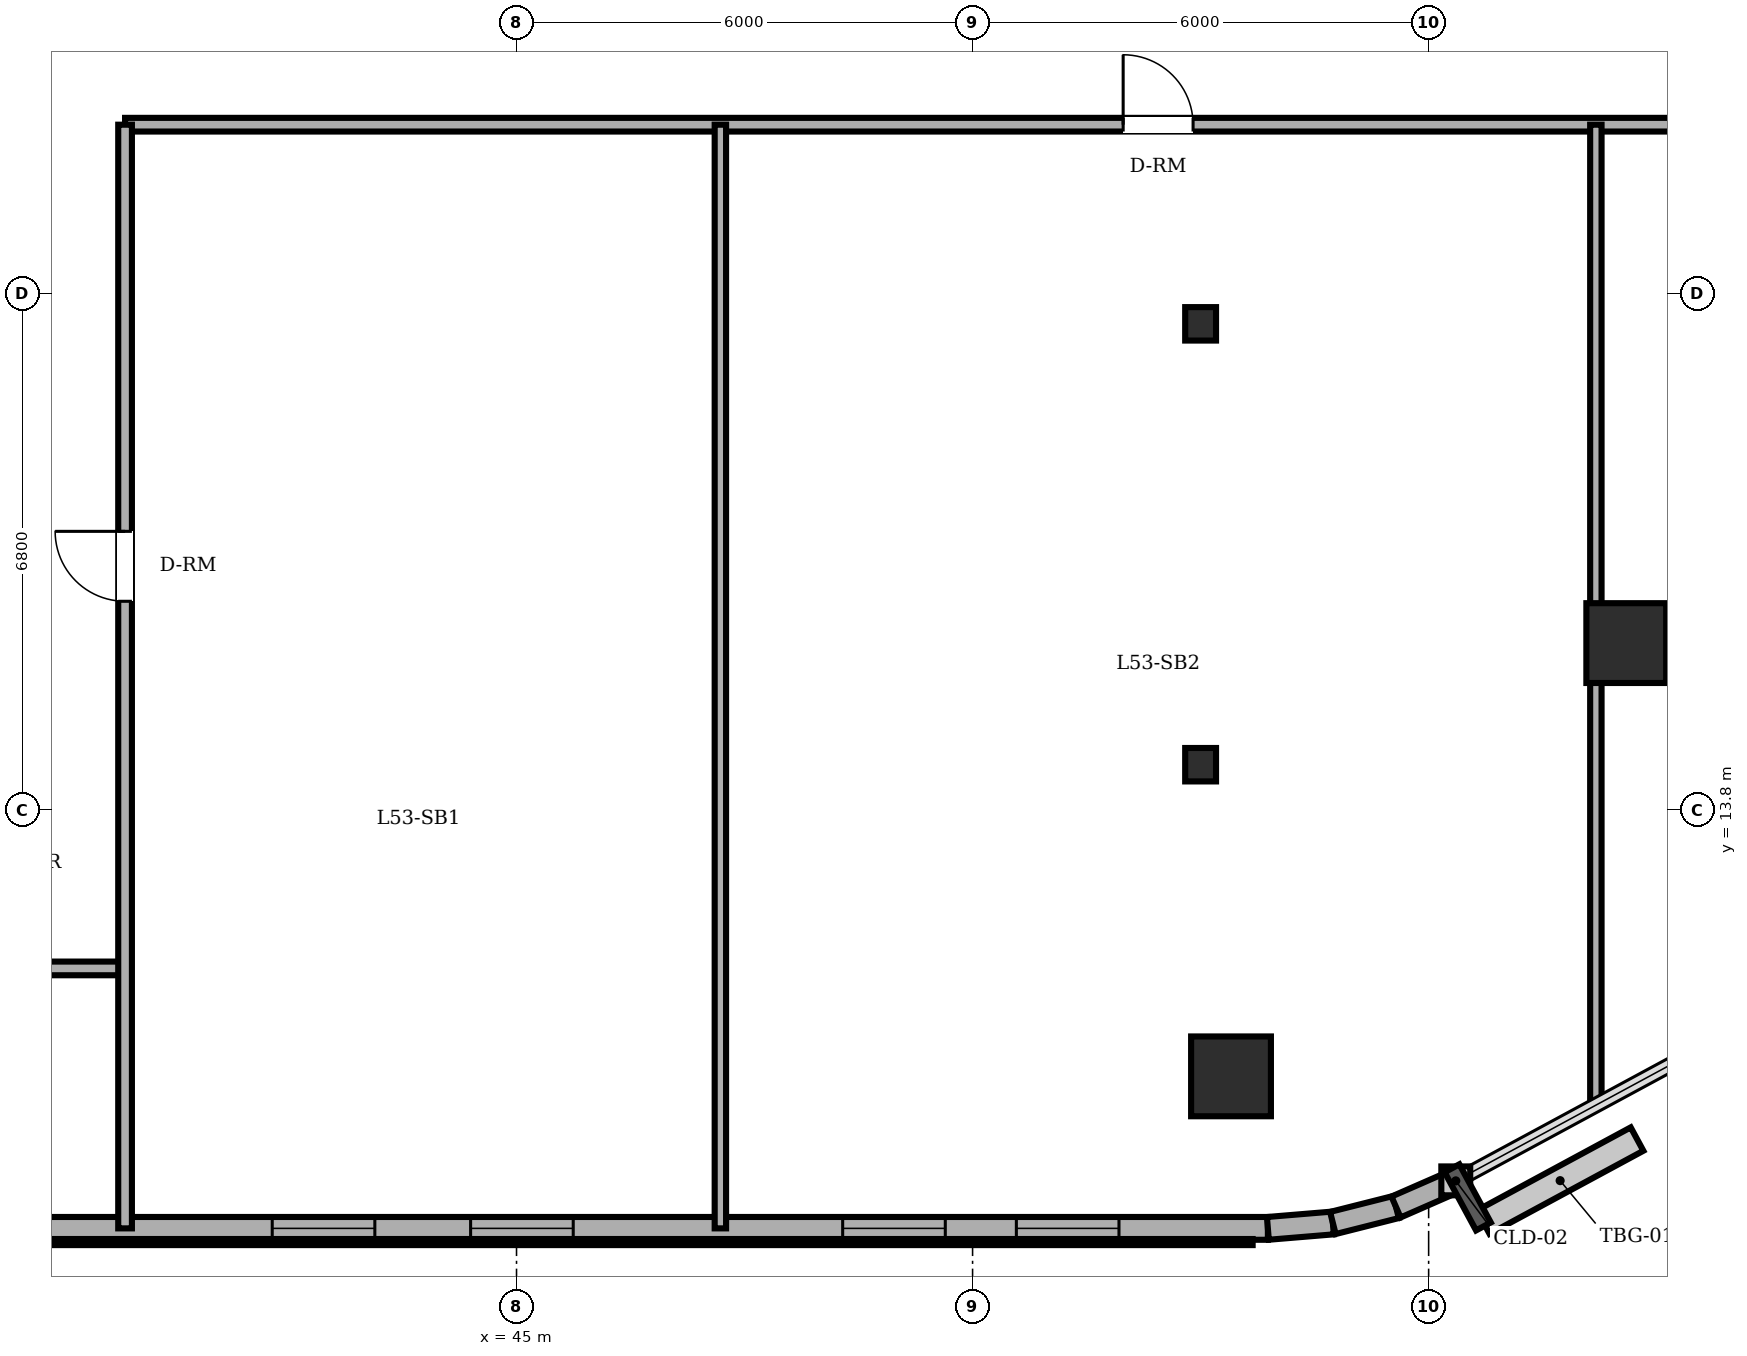
"""IFC4 building model, lengths in metres.
Left out: names, types, materials, properties, quantities, classifications, styles, units other than length and angle.
Written with IfcOpenShell. Run it as: python <this file> out.ifc"""

import sys

from ifc_helpers import new_model, si_unit, direction, frame, frame_2d, origin, origin_2d, place, context, subcontext, project, spatial, rectangle, circle, i_section, extrude, element, fill, save


model = new_model("IFC4")
c1 = context("Model", 3, precision=1e-05, world=origin(), true_north=direction((0.0, 1.0)))
c2 = subcontext(c1, "Body", "Model", "MODEL_VIEW")
j1 = project(units=[si_unit("LENGTHUNIT", "METRE"), si_unit("PLANEANGLEUNIT", "RADIAN")], contexts=[c1])
p1 = place(None, origin())
s1 = spatial("IfcSite", under=j1, at=p1, CompositionType="ELEMENT")
p2 = place(p1, origin())
s2 = spatial("IfcBuilding", under=s1, at=p2, CompositionType="ELEMENT")
p3 = place(p2, frame((0.0, 0.0, 204.9)))
s3 = spatial("IfcBuildingStorey", under=s2, at=p3, CompositionType="ELEMENT", Elevation=204.9)
for number, where, z_axis, x_axis in (
    (1, (54.4, 10.3, 0.0), (0.0, 0.0, 1.0), (1.0, 0.0, 0.0)),
    (2, (59.6, 16.0, 0.0), (0.0, 0.0, 1.0), (1.0, 0.0, 0.0)),
):
    element("IfcColumn", number, at=place(p3, frame(where, z_axis=z_axis, x_axis=x_axis)), inside=s3, PredefinedType="COLUMN", context=c2, shape_type="SweptSolid", body=[
        extrude(circle(Radius=0.525, at=origin_2d()), origin(), (0.0, 0.0, 1.0), 3.6),
    ])
for number, where, z_axis, x_axis in (
    (3, (54.0, 14.4, 0.0), (0.0, 0.0, 1.0), (1.0, 0.0, 0.0)),
    (4, (54.0, 20.2, 0.0), (0.0, 0.0, 1.0), (1.0, 0.0, 0.0)),
):
    element("IfcColumn", number, at=place(p3, frame(where, z_axis=z_axis, x_axis=x_axis)), inside=s3, PredefinedType="COLUMN", context=c2, shape_type="SweptSolid", body=[
        extrude(i_section(OverallWidth=0.406, OverallDepth=0.44, WebThickness=0.024, FlangeThickness=0.039, FilletRadius=0.015, at=origin_2d()), origin(), (0.0, 0.0, 1.0), 3.6),
    ])
p4 = place(p3, frame((22.4, 8.3, 0.0), z_axis=(0.0, 0.0, 1.0), x_axis=(1.0, 0.0, 0.0)))
e5 = element("IfcWall", 5, at=p4, inside=s3, PredefinedType="SOLIDWALL", context=c2, shape_type="SweptSolid", body=[
    extrude(rectangle(XDim=32.485, YDim=0.3, at=frame_2d((16.243, 0.0))), origin(), (0.0, 0.0, 1.0), 3.4),
])
p5 = place(p4, frame((8.175, 0.0, 0.0)))
e6 = element("IfcOpeningElement", 6, at=p5, cuts=e5, PredefinedType="OPENING", context=c2, shape_type="SweptSolid", body=[
    extrude(rectangle(XDim=0.95, YDim=2.2, at=frame_2d((0.475, 1.1))), frame((0.0, 0.16, 0.0), z_axis=(0.0, -1.0, 0.0), x_axis=(1.0, 0.0, 0.0)), (0.0, 0.0, 1.0), 0.32),
])
p6 = place(p4, frame((1.3, 0.0, 0.85)))
e7 = element("IfcOpeningElement", 7, at=p6, cuts=e5, PredefinedType="OPENING", context=c2, shape_type="SweptSolid", body=[
    extrude(rectangle(XDim=1.35, YDim=1.55, at=frame_2d((0.675, 0.775))), frame((0.0, 0.16, 0.0), z_axis=(0.0, -1.0, 0.0), x_axis=(1.0, 0.0, 0.0)), (0.0, 0.0, 1.0), 0.32),
])
p7 = place(p4, frame((4.825, 0.0, 0.85)))
e8 = element("IfcOpeningElement", 8, at=p7, cuts=e5, PredefinedType="OPENING", context=c2, shape_type="SweptSolid", body=[
    extrude(rectangle(XDim=1.35, YDim=1.55, at=frame_2d((0.675, 0.775))), frame((0.0, 0.16, 0.0), z_axis=(0.0, -1.0, 0.0), x_axis=(1.0, 0.0, 0.0)), (0.0, 0.0, 1.0), 0.32),
])
p8 = place(p4, frame((10.075, 0.0, 0.85)))
e9 = element("IfcOpeningElement", 9, at=p8, cuts=e5, PredefinedType="OPENING", context=c2, shape_type="SweptSolid", body=[
    extrude(rectangle(XDim=1.35, YDim=1.55, at=frame_2d((0.675, 0.775))), frame((0.0, 0.16, 0.0), z_axis=(0.0, -1.0, 0.0), x_axis=(1.0, 0.0, 0.0)), (0.0, 0.0, 1.0), 0.32),
])
p9 = place(p4, frame((13.425, 0.0, 0.85)))
e10 = element("IfcOpeningElement", 10, at=p9, cuts=e5, PredefinedType="OPENING", context=c2, shape_type="SweptSolid", body=[
    extrude(rectangle(XDim=1.35, YDim=1.55, at=frame_2d((0.675, 0.775))), frame((0.0, 0.16, 0.0), z_axis=(0.0, -1.0, 0.0), x_axis=(1.0, 0.0, 0.0)), (0.0, 0.0, 1.0), 0.32),
])
p10 = place(p4, frame((19.386, 0.0, 0.85)))
e11 = element("IfcOpeningElement", 11, at=p10, cuts=e5, PredefinedType="OPENING", context=c2, shape_type="SweptSolid", body=[
    extrude(rectangle(XDim=1.35, YDim=1.55, at=frame_2d((0.675, 0.775))), frame((0.0, 0.16, 0.0), z_axis=(0.0, -1.0, 0.0), x_axis=(1.0, 0.0, 0.0)), (0.0, 0.0, 1.0), 0.32),
])
p11 = place(p4, frame((21.996, 0.0, 0.85)))
e12 = element("IfcOpeningElement", 12, at=p11, cuts=e5, PredefinedType="OPENING", context=c2, shape_type="SweptSolid", body=[
    extrude(rectangle(XDim=1.35, YDim=1.55, at=frame_2d((0.675, 0.775))), frame((0.0, 0.16, 0.0), z_axis=(0.0, -1.0, 0.0), x_axis=(1.0, 0.0, 0.0)), (0.0, 0.0, 1.0), 0.32),
])
p12 = place(p4, frame((26.891, 0.0, 0.85)))
e13 = element("IfcOpeningElement", 13, at=p12, cuts=e5, PredefinedType="OPENING", context=c2, shape_type="SweptSolid", body=[
    extrude(rectangle(XDim=1.35, YDim=1.55, at=frame_2d((0.675, 0.775))), frame((0.0, 0.16, 0.0), z_axis=(0.0, -1.0, 0.0), x_axis=(1.0, 0.0, 0.0)), (0.0, 0.0, 1.0), 0.32),
])
p13 = place(p4, frame((29.176, 0.0, 0.85)))
e14 = element("IfcOpeningElement", 14, at=p13, cuts=e5, PredefinedType="OPENING", context=c2, shape_type="SweptSolid", body=[
    extrude(rectangle(XDim=1.35, YDim=1.55, at=frame_2d((0.675, 0.775))), frame((0.0, 0.16, 0.0), z_axis=(0.0, -1.0, 0.0), x_axis=(1.0, 0.0, 0.0)), (0.0, 0.0, 1.0), 0.32),
])
p14 = place(p3, frame((54.885, 8.3, 0.0), z_axis=(0.0, 0.0, 1.0), x_axis=(0.996565355958, 0.082809971041, 0.0)))
e15 = element("IfcWall", 15, at=p14, inside=s3, PredefinedType="SOLIDWALL", context=c2, shape_type="SweptSolid", body=[
    extrude(rectangle(XDim=0.858, YDim=0.3, at=frame_2d((0.429, 0.0))), origin(), (0.0, 0.0, 1.0), 3.4),
])
p15 = place(p3, frame((55.74, 8.371, 0.0), z_axis=(0.0, 0.0, 1.0), x_axis=(0.969536346338, 0.244947490555, 0.0)))
e16 = element("IfcWall", 16, at=p15, inside=s3, PredefinedType="SOLIDWALL", context=c2, shape_type="SweptSolid", body=[
    extrude(rectangle(XDim=0.857, YDim=0.3, at=frame_2d((0.429, 0.0))), origin(), (0.0, 0.0, 1.0), 3.4),
])
p16 = place(p3, frame((56.571, 8.581, 0.0), z_axis=(0.0, 0.0, 1.0), x_axis=(0.916085473636, 0.400983048261, 0.0)))
e17 = element("IfcWall", 17, at=p16, inside=s3, PredefinedType="SOLIDWALL", context=c2, shape_type="SweptSolid", body=[
    extrude(rectangle(XDim=0.858, YDim=0.3, at=frame_2d((0.429, 0.0))), origin(), (0.0, 0.0, 1.0), 3.4),
])
p17 = place(p3, frame((17.677, 11.72, 0.0), z_axis=(0.0, 0.0, 1.0), x_axis=(1.0, 0.0, 0.0)))
e18 = element("IfcWall", 18, at=p17, inside=s3, PredefinedType="PARTITIONING", context=c2, shape_type="SweptSolid", body=[
    extrude(rectangle(XDim=22.173, YDim=0.18, at=frame_2d((11.086, 0.0))), origin(), (0.0, 0.0, 1.0), 3.4),
])
p18 = place(p17, frame((9.763, 0.0, 0.0)))
e19 = element("IfcOpeningElement", 19, at=p18, cuts=e18, PredefinedType="OPENING", context=c2, shape_type="SweptSolid", body=[
    extrude(rectangle(XDim=0.92, YDim=2.1, at=frame_2d((0.46, 1.05))), frame((0.0, 0.1, 0.0), z_axis=(0.0, -1.0, 0.0), x_axis=(1.0, 0.0, 0.0)), (0.0, 0.0, 1.0), 0.2),
])
p19 = place(p17, frame((4.063, 0.0, 0.0)))
e20 = element("IfcOpeningElement", 20, at=p19, cuts=e18, PredefinedType="OPENING", context=c2, shape_type="SweptSolid", body=[
    extrude(rectangle(XDim=0.92, YDim=2.1, at=frame_2d((0.46, 1.05))), frame((0.0, 0.1, 0.0), z_axis=(0.0, -1.0, 0.0), x_axis=(1.0, 0.0, 0.0)), (0.0, 0.0, 1.0), 0.2),
])
p20 = place(p17, frame((16.428, 0.0, 0.0)))
e21 = element("IfcOpeningElement", 21, at=p20, cuts=e18, PredefinedType="OPENING", context=c2, shape_type="SweptSolid", body=[
    extrude(rectangle(XDim=0.92, YDim=2.1, at=frame_2d((0.46, 1.05))), frame((0.0, 0.1, 0.0), z_axis=(0.0, -1.0, 0.0), x_axis=(1.0, 0.0, 0.0)), (0.0, 0.0, 1.0), 0.2),
])
p21 = place(p3, frame((39.85, 22.82, 0.0), z_axis=(0.0, 0.0, 1.0), x_axis=(1.0, 0.0, 0.0)))
e22 = element("IfcWall", 22, at=p21, inside=s3, PredefinedType="PARTITIONING", context=c2, shape_type="SweptSolid", body=[
    extrude(rectangle(XDim=28.75, YDim=0.18, at=frame_2d((14.375, 0.0))), origin(), (0.0, 0.0, 1.0), 3.4),
])
p22 = place(p21, frame((13.131, 0.0, 0.0)))
e23 = element("IfcOpeningElement", 23, at=p22, cuts=e22, PredefinedType="OPENING", context=c2, shape_type="SweptSolid", body=[
    extrude(rectangle(XDim=0.92, YDim=2.1, at=frame_2d((0.46, 1.05))), frame((0.0, 0.1, 0.0), z_axis=(0.0, -1.0, 0.0), x_axis=(1.0, 0.0, 0.0)), (0.0, 0.0, 1.0), 0.2),
])
p23 = place(p21, frame((21.19, 0.0, 0.0)))
e24 = element("IfcOpeningElement", 24, at=p23, cuts=e22, PredefinedType="OPENING", context=c2, shape_type="SweptSolid", body=[
    extrude(rectangle(XDim=0.92, YDim=2.1, at=frame_2d((0.46, 1.05))), frame((0.0, 0.1, 0.0), z_axis=(0.0, -1.0, 0.0), x_axis=(1.0, 0.0, 0.0)), (0.0, 0.0, 1.0), 0.2),
])
p24 = place(p3, frame((39.85, 8.3, 0.0), z_axis=(0.0, 0.0, 1.0), x_axis=(0.0, 1.0, 0.0)))
e25 = element("IfcWall", 25, at=p24, inside=s3, PredefinedType="PARTITIONING", context=c2, shape_type="SweptSolid", body=[
    extrude(rectangle(XDim=14.52, YDim=0.18, at=frame_2d((7.26, 0.0))), origin(), (0.0, 0.0, 1.0), 3.4),
])
p25 = place(p24, frame((8.25, 0.0, 0.0)))
e26 = element("IfcOpeningElement", 26, at=p25, cuts=e25, PredefinedType="OPENING", context=c2, shape_type="SweptSolid", body=[
    extrude(rectangle(XDim=0.92, YDim=2.1, at=frame_2d((0.46, 1.05))), frame((0.0, 0.1, 0.0), z_axis=(0.0, -1.0, 0.0), x_axis=(1.0, 0.0, 0.0)), (0.0, 0.0, 1.0), 0.2),
])
p26 = place(p3, frame((47.682, 8.3, 0.0), z_axis=(0.0, 0.0, 1.0), x_axis=(0.0, 1.0, 0.0)))
e27 = element("IfcWall", 27, at=p26, inside=s3, PredefinedType="PARTITIONING", context=c2, shape_type="SweptSolid", body=[
    extrude(rectangle(XDim=14.52, YDim=0.15, at=frame_2d((7.26, 0.0))), origin(), (0.0, 0.0, 1.0), 3.4),
])
p27 = place(p3, frame((59.2, 9.921, 0.0), z_axis=(0.0, 0.0, 1.0), x_axis=(0.0, 1.0, 0.0)))
e28 = element("IfcWall", 28, at=p27, inside=s3, PredefinedType="PARTITIONING", context=c2, shape_type="SweptSolid", body=[
    extrude(rectangle(XDim=12.899, YDim=0.15, at=frame_2d((6.45, 0.0))), origin(), (0.0, 0.0, 1.0), 3.4),
])
p28 = place(p10, origin())
e29 = element("IfcWindow", 29, at=p28, inside=s3, PartitioningType="SINGLE_PANEL", PredefinedType="WINDOW", context=c2, shape_type="SweptSolid", body=[
    extrude(rectangle(XDim=1.35, YDim=1.55, at=frame_2d((0.675, 0.775))), frame((0.0, 0.03, 0.0), z_axis=(0.0, -1.0, 0.0), x_axis=(1.0, 0.0, 0.0)), (0.0, 0.0, 1.0), 0.06),
])
fill(e11, e29)
p29 = place(p11, origin())
e30 = element("IfcWindow", 30, at=p29, inside=s3, PartitioningType="SINGLE_PANEL", PredefinedType="WINDOW", context=c2, shape_type="SweptSolid", body=[
    extrude(rectangle(XDim=1.35, YDim=1.55, at=frame_2d((0.675, 0.775))), frame((0.0, 0.03, 0.0), z_axis=(0.0, -1.0, 0.0), x_axis=(1.0, 0.0, 0.0)), (0.0, 0.0, 1.0), 0.06),
])
fill(e12, e30)
p30 = place(p12, origin())
e31 = element("IfcWindow", 31, at=p30, inside=s3, PartitioningType="SINGLE_PANEL", PredefinedType="WINDOW", context=c2, shape_type="SweptSolid", body=[
    extrude(rectangle(XDim=1.35, YDim=1.55, at=frame_2d((0.675, 0.775))), frame((0.0, 0.03, 0.0), z_axis=(0.0, -1.0, 0.0), x_axis=(1.0, 0.0, 0.0)), (0.0, 0.0, 1.0), 0.06),
])
fill(e13, e31)
p31 = place(p13, origin())
e32 = element("IfcWindow", 32, at=p31, inside=s3, PartitioningType="SINGLE_PANEL", PredefinedType="WINDOW", context=c2, shape_type="SweptSolid", body=[
    extrude(rectangle(XDim=1.35, YDim=1.55, at=frame_2d((0.675, 0.775))), frame((0.0, 0.03, 0.0), z_axis=(0.0, -1.0, 0.0), x_axis=(1.0, 0.0, 0.0)), (0.0, 0.0, 1.0), 0.06),
])
fill(e14, e32)
p32 = place(p25, origin())
e33 = element("IfcDoor", 33, at=p32, inside=s3, OperationType="SINGLE_SWING_RIGHT", PredefinedType="DOOR", context=c2, shape_type="SweptSolid", body=[
    extrude(rectangle(XDim=0.92, YDim=2.1, at=frame_2d((0.46, 1.05))), frame((0.0, 0.025, 0.0), z_axis=(0.0, -1.0, 0.0), x_axis=(1.0, 0.0, 0.0)), (0.0, 0.0, 1.0), 0.05),
])
fill(e26, e33)
p33 = place(p22, origin())
e34 = element("IfcDoor", 34, at=p33, inside=s3, OperationType="SINGLE_SWING_LEFT", PredefinedType="DOOR", context=c2, shape_type="SweptSolid", body=[
    extrude(rectangle(XDim=0.92, YDim=2.1, at=frame_2d((0.46, 1.05))), frame((0.0, 0.025, 0.0), z_axis=(0.0, -1.0, 0.0), x_axis=(1.0, 0.0, 0.0)), (0.0, 0.0, 1.0), 0.05),
])
fill(e23, e34)
save(model, sys.argv[1])
